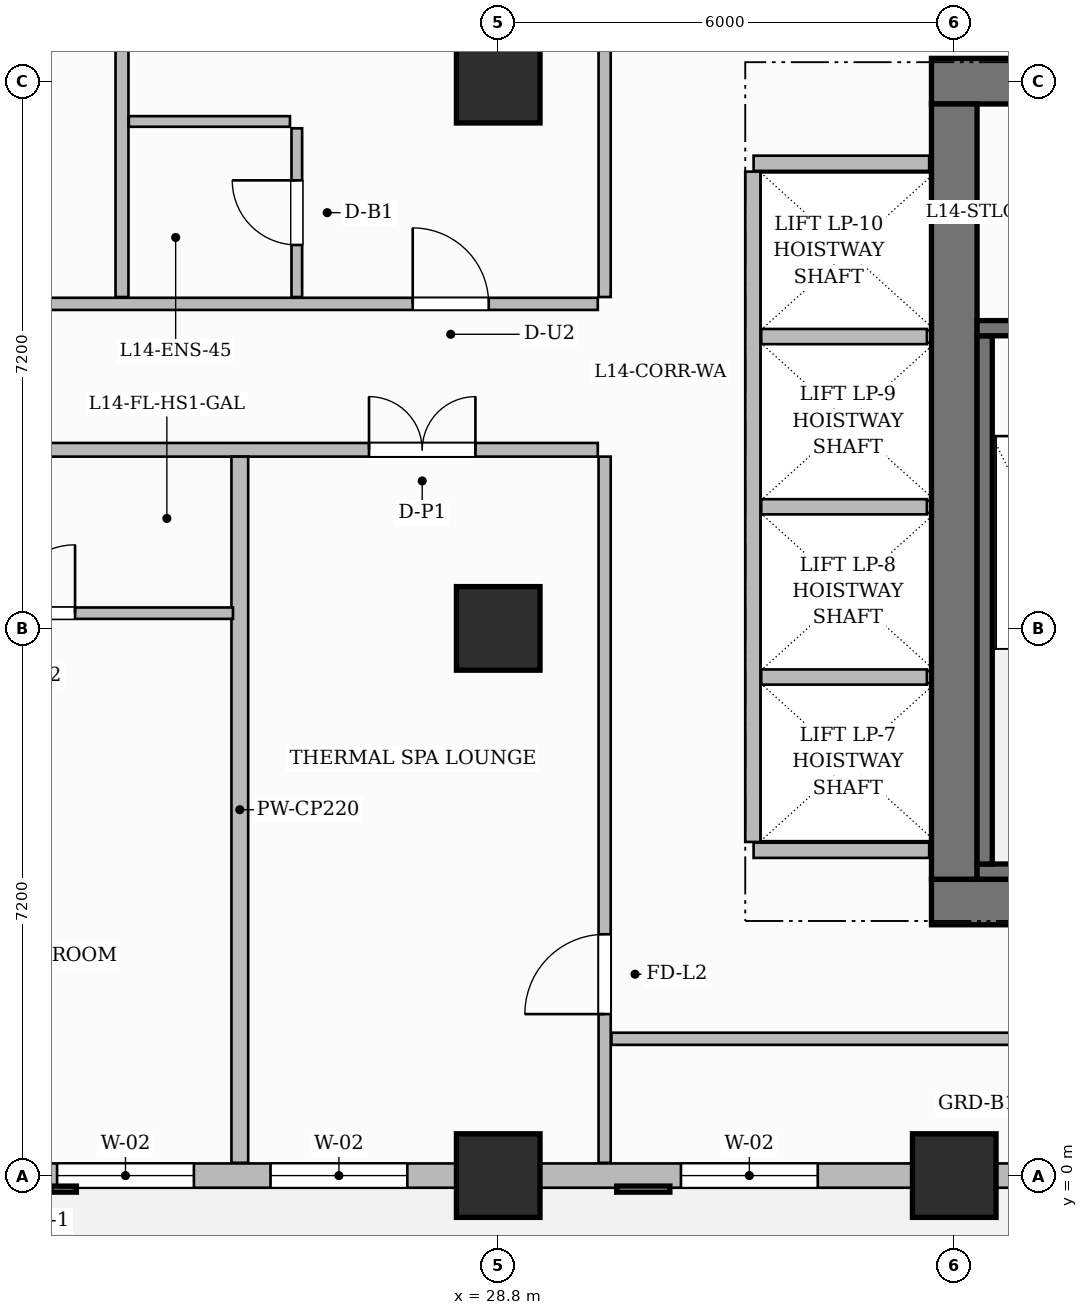
"""IFC4 building model, lengths in metres.
Left out: names, types, materials, properties, quantities, classifications, styles, units other than length and angle.
Written with IfcOpenShell. Run it as: python <this file> out.ifc"""

import sys

from ifc_helpers import new_model, si_unit, direction, frame, frame_2d, origin, origin_2d, place, context, subcontext, project, spatial, rectangle, extrude, source, transform, mapped, element, fill, save


model = new_model("IFC4")
c1 = context("Model", 3, precision=1e-05, world=origin(), true_north=direction((0.0, 1.0)))
c2 = subcontext(c1, "Body", "Model", "MODEL_VIEW")
j1 = project(units=[si_unit("LENGTHUNIT", "METRE"), si_unit("PLANEANGLEUNIT", "RADIAN")], contexts=[c1])
p1 = place(None, origin())
s1 = spatial("IfcSite", under=j1, at=p1, CompositionType="ELEMENT")
p2 = place(p1, origin())
s2 = spatial("IfcBuilding", under=s1, at=p2, CompositionType="ELEMENT")
p3 = place(p2, frame((0.0, 0.0, 62.0)))
s3 = spatial("IfcBuildingStorey", under=s2, at=p3, CompositionType="ELEMENT", Elevation=62.0)
p4 = place(p3, frame((34.5, 3.6, 0.0), z_axis=(0.0, 0.0, 1.0), x_axis=(1.0, 0.0, 0.0)))
e1 = element("IfcWall", 1, at=p4, inside=s3, PredefinedType="SHEAR", context=c2, shape_type="SweptSolid", body=[
    extrude(rectangle(XDim=15.6, YDim=0.6, at=frame_2d((7.8, 0.0))), origin(), (0.0, 0.0, 1.0), 3.7),
])
p5 = place(p4, frame((4.5, 0.0, 0.0)))
e2 = element("IfcOpeningElement", 2, at=p5, cuts=e1, PredefinedType="OPENING", context=c2, shape_type="SweptSolid", body=[
    extrude(rectangle(XDim=0.9, YDim=2.1, at=frame_2d((0.45, 1.05))), frame((0.0, 0.31, 0.0), z_axis=(0.0, -1.0, 0.0), x_axis=(1.0, 0.0, 0.0)), (0.0, 0.0, 1.0), 0.62),
])
p6 = place(p4, frame((6.95, 0.0, 0.0)))
e3 = element("IfcOpeningElement", 3, at=p6, cuts=e1, PredefinedType="OPENING", context=c2, shape_type="SweptSolid", body=[
    extrude(rectangle(XDim=0.9, YDim=2.1, at=frame_2d((0.45, 1.05))), frame((0.0, 0.31, 0.0), z_axis=(0.0, -1.0, 0.0), x_axis=(1.0, 0.0, 0.0)), (0.0, 0.0, 1.0), 0.62),
])
p7 = place(p3, frame((34.5, 14.4, 0.0), z_axis=(0.0, 0.0, 1.0), x_axis=(1.0, 0.0, 0.0)))
e4 = element("IfcWall", 4, at=p7, inside=s3, PredefinedType="SHEAR", context=c2, shape_type="SweptSolid", body=[
    extrude(rectangle(XDim=15.6, YDim=0.6, at=frame_2d((7.8, 0.0))), origin(), (0.0, 0.0, 1.0), 3.7),
])
p8 = place(p7, frame((5.43, 0.0, 0.0)))
e5 = element("IfcOpeningElement", 5, at=p8, cuts=e4, PredefinedType="OPENING", context=c2, shape_type="SweptSolid", body=[
    extrude(rectangle(XDim=1.5, YDim=2.2, at=frame_2d((0.75, 1.1))), frame((0.0, 0.31, 0.0), z_axis=(0.0, -1.0, 0.0), x_axis=(1.0, 0.0, 0.0)), (0.0, 0.0, 1.0), 0.62),
])
p9 = place(p7, frame((1.645, 0.0, 0.0)))
e6 = element("IfcOpeningElement", 6, at=p9, cuts=e4, PredefinedType="OPENING", context=c2, shape_type="SweptSolid", body=[
    extrude(rectangle(XDim=1.05, YDim=2.15, at=frame_2d((0.525, 1.075))), frame((0.0, 0.31, 0.0), z_axis=(0.0, -1.0, 0.0), x_axis=(1.0, 0.0, 0.0)), (0.0, 0.0, 1.0), 0.62),
])
p10 = place(p7, frame((11.275, 0.0, 0.0)))
e7 = element("IfcOpeningElement", 7, at=p10, cuts=e4, PredefinedType="OPENING", context=c2, shape_type="SweptSolid", body=[
    extrude(rectangle(XDim=1.05, YDim=2.15, at=frame_2d((0.525, 1.075))), frame((0.0, 0.31, 0.0), z_axis=(0.0, -1.0, 0.0), x_axis=(1.0, 0.0, 0.0)), (0.0, 0.0, 1.0), 0.62),
])
p11 = place(p3, frame((34.8, 3.9, 0.0), z_axis=(0.0, 0.0, 1.0), x_axis=(0.0, 1.0, 0.0)))
e8 = element("IfcWall", 8, at=p11, inside=s3, PredefinedType="SHEAR", context=c2, shape_type="SweptSolid", body=[
    extrude(rectangle(XDim=10.2, YDim=0.6, at=frame_2d((5.1, 0.0))), origin(), (0.0, 0.0, 1.0), 3.7),
])
m1 = source(origin(), c2, "Body", "SweptSolid", [
    extrude(rectangle(XDim=1.1, YDim=1.1, at=origin_2d()), origin(), (0.0, 0.0, 1.0), 3.7),
])
for number, where, z_axis, x_axis in (
    (9, (28.8, 0.0, 0.0), (0.0, 0.0, 1.0), (1.0, 0.0, 0.0)),
    (10, (28.8, 7.2, 0.0), (0.0, 0.0, 1.0), (1.0, 0.0, 0.0)),
    (11, (28.8, 14.4, 0.0), (0.0, 0.0, 1.0), (1.0, 0.0, 0.0)),
    (12, (34.8, 0.0, 0.0), (0.0, 0.0, 1.0), (1.0, 0.0, 0.0)),
):
    element("IfcColumn", number, at=place(p3, frame(where, z_axis=z_axis, x_axis=x_axis)), inside=s3, PredefinedType="COLUMN", context=c2, shape_type="MappedRepresentation", body=[
        mapped(m1, transform((0.0, 0.0, 0.0), scale=1.0)),
    ])
p12 = place(p3, frame((35.1, 4.0, 0.0), z_axis=(0.0, 0.0, 1.0), x_axis=(1.0, 0.0, 0.0)))
e13 = element("IfcWall", 13, at=p12, inside=s3, PredefinedType="SHEAR", context=c2, shape_type="SweptSolid", body=[
    extrude(rectangle(XDim=3.14, YDim=0.2, at=frame_2d((1.57, 0.0))), origin(), (0.0, 0.0, 1.0), 3.7),
])
p13 = place(p3, frame((35.2, 4.1, 0.0), z_axis=(0.0, 0.0, 1.0), x_axis=(0.0, 1.0, 0.0)))
e14 = element("IfcWall", 14, at=p13, inside=s3, PredefinedType="SHEAR", context=c2, shape_type="SweptSolid", body=[
    extrude(rectangle(XDim=6.95, YDim=0.2, at=frame_2d((3.475, 0.0))), origin(), (0.0, 0.0, 1.0), 3.7),
])
p14 = place(p3, frame((35.1, 11.15, 0.0), z_axis=(0.0, 0.0, 1.0), x_axis=(1.0, 0.0, 0.0)))
e15 = element("IfcWall", 15, at=p14, inside=s3, PredefinedType="SHEAR", context=c2, shape_type="SweptSolid", body=[
    extrude(rectangle(XDim=3.14, YDim=0.2, at=frame_2d((1.57, 0.0))), origin(), (0.0, 0.0, 1.0), 3.7),
])
p15 = place(p14, frame((1.045, 0.0, 0.0)))
e16 = element("IfcOpeningElement", 16, at=p15, cuts=e15, PredefinedType="OPENING", context=c2, shape_type="SweptSolid", body=[
    extrude(rectangle(XDim=1.05, YDim=2.2, at=frame_2d((0.525, 1.1))), frame((0.0, 0.11, 0.0), z_axis=(0.0, -1.0, 0.0), x_axis=(1.0, 0.0, 0.0)), (0.0, 0.0, 1.0), 0.22),
])
for number, where, z_axis, x_axis in (
    (17, (32.16, 4.28, 0.0), (0.0, 0.0, 1.0), (1.0, 0.0, 0.0)),
    (18, (32.16, 13.32, 0.0), (0.0, 0.0, 1.0), (1.0, 0.0, 0.0)),
):
    element("IfcWall", number, at=place(p3, frame(where, z_axis=z_axis, x_axis=x_axis)), inside=s3, PredefinedType="PARTITIONING", context=c2, shape_type="SweptSolid", body=[
        extrude(rectangle(XDim=2.31, YDim=0.2, at=frame_2d((1.155, 0.0))), origin(), (0.0, 0.0, 1.0), 3.45),
    ])
p16 = place(p3, frame((32.15, 4.39, 0.0), z_axis=(0.0, 0.0, 1.0), x_axis=(0.0, 1.0, 0.0)))
e19 = element("IfcWall", 19, at=p16, inside=s3, PredefinedType="PARTITIONING", context=c2, shape_type="SweptSolid", body=[
    extrude(rectangle(XDim=8.82, YDim=0.2, at=frame_2d((4.41, 0.0))), origin(), (0.0, 0.0, 1.0), 3.45),
])
for number, where, z_axis, x_axis in (
    (20, (32.26, 6.56, 0.0), (0.0, 0.0, 1.0), (1.0, 0.0, 0.0)),
    (21, (32.26, 8.8, 0.0), (0.0, 0.0, 1.0), (1.0, 0.0, 0.0)),
    (22, (32.26, 11.04, 0.0), (0.0, 0.0, 1.0), (1.0, 0.0, 0.0)),
):
    element("IfcWall", number, at=place(p3, frame(where, z_axis=z_axis, x_axis=x_axis)), inside=s3, PredefinedType="PARTITIONING", context=c2, shape_type="SweptSolid", body=[
        extrude(rectangle(XDim=2.18, YDim=0.2, at=frame_2d((1.09, 0.0))), origin(), (0.0, 0.0, 1.0), 3.45),
    ])
p17 = place(p3, frame((14.568, 9.55, 0.0), z_axis=(0.0, 0.0, 1.0), x_axis=(1.0, 0.0, 0.0)))
e23 = element("IfcWall", 23, at=p17, inside=s3, PredefinedType="PARTITIONING", context=c2, shape_type="SweptSolid", body=[
    extrude(rectangle(XDim=15.542, YDim=0.18, at=frame_2d((7.771, 0.0))), origin(), (0.0, 0.0, 1.0), 3.45),
])
p18 = place(p17, frame((3.062, 0.0, 0.0)))
e24 = element("IfcOpeningElement", 24, at=p18, cuts=e23, PredefinedType="OPENING", context=c2, shape_type="SweptSolid", body=[
    extrude(rectangle(XDim=1.05, YDim=2.25, at=frame_2d((0.525, 1.125))), frame((0.0, 0.1, 0.0), z_axis=(0.0, -1.0, 0.0), x_axis=(1.0, 0.0, 0.0)), (0.0, 0.0, 1.0), 0.2),
])
p19 = place(p17, frame((12.532, 0.0, 0.0)))
e25 = element("IfcOpeningElement", 25, at=p19, cuts=e23, PredefinedType="OPENING", context=c2, shape_type="SweptSolid", body=[
    extrude(rectangle(XDim=1.4, YDim=2.35, at=frame_2d((0.7, 1.175))), frame((0.0, 0.1, 0.0), z_axis=(0.0, -1.0, 0.0), x_axis=(1.0, 0.0, 0.0)), (0.0, 0.0, 1.0), 0.2),
])
p20 = place(p3, frame((14.568, 11.47, 0.0), z_axis=(0.0, 0.0, 1.0), x_axis=(1.0, 0.0, 0.0)))
e26 = element("IfcWall", 26, at=p20, inside=s3, PredefinedType="PARTITIONING", context=c2, shape_type="SweptSolid", body=[
    extrude(rectangle(XDim=15.542, YDim=0.16, at=frame_2d((7.771, 0.0))), origin(), (0.0, 0.0, 1.0), 3.45),
])
p21 = place(p20, frame((4.132, 0.0, 0.0)))
e27 = element("IfcOpeningElement", 27, at=p21, cuts=e26, PredefinedType="OPENING", context=c2, shape_type="SweptSolid", body=[
    extrude(rectangle(XDim=0.95, YDim=2.15, at=frame_2d((0.475, 1.075))), frame((0.0, 0.09, 0.0), z_axis=(0.0, -1.0, 0.0), x_axis=(1.0, 0.0, 0.0)), (0.0, 0.0, 1.0), 0.18),
])
p22 = place(p20, frame((13.107, 0.0, 0.0)))
e28 = element("IfcOpeningElement", 28, at=p22, cuts=e26, PredefinedType="OPENING", context=c2, shape_type="SweptSolid", body=[
    extrude(rectangle(XDim=1.0, YDim=2.2, at=frame_2d((0.5, 1.1))), frame((0.0, 0.09, 0.0), z_axis=(0.0, -1.0, 0.0), x_axis=(1.0, 0.0, 0.0)), (0.0, 0.0, 1.0), 0.18),
])
p23 = place(p3, frame((30.2, 11.56, 0.0), z_axis=(0.0, 0.0, 1.0), x_axis=(0.0, 1.0, 0.0)))
e29 = element("IfcWall", 29, at=p23, inside=s3, PredefinedType="PARTITIONING", context=c2, shape_type="SweptSolid", body=[
    extrude(rectangle(XDim=9.9, YDim=0.16, at=frame_2d((4.95, 0.0))), origin(), (0.0, 0.0, 1.0), 3.45),
])
p24 = place(p3, frame((30.2, 0.168, 0.0), z_axis=(0.0, 0.0, 1.0), x_axis=(0.0, 1.0, 0.0)))
e30 = element("IfcWall", 30, at=p24, inside=s3, PredefinedType="PARTITIONING", context=c2, shape_type="SweptSolid", body=[
    extrude(rectangle(XDim=9.292, YDim=0.16, at=frame_2d((4.646, 0.0))), origin(), (0.0, 0.0, 1.0), 3.45),
])
p25 = place(p24, frame((1.957, 0.0, 0.0)))
e31 = element("IfcOpeningElement", 31, at=p25, cuts=e30, PredefinedType="OPENING", context=c2, shape_type="SweptSolid", body=[
    extrude(rectangle(XDim=1.05, YDim=2.15, at=frame_2d((0.525, 1.075))), frame((0.0, 0.09, 0.0), z_axis=(0.0, -1.0, 0.0), x_axis=(1.0, 0.0, 0.0)), (0.0, 0.0, 1.0), 0.18),
])
p26 = place(p3, frame((30.29, 1.8, 0.0), z_axis=(0.0, 0.0, 1.0), x_axis=(1.0, 0.0, 0.0)))
e32 = element("IfcWall", 32, at=p26, inside=s3, PredefinedType="PARTITIONING", context=c2, shape_type="SweptSolid", body=[
    extrude(rectangle(XDim=19.37, YDim=0.16, at=frame_2d((9.685, 0.0))), origin(), (0.0, 0.0, 1.0), 3.45),
])
p27 = place(p26, frame((9.735, 0.0, 0.0)))
e33 = element("IfcOpeningElement", 33, at=p27, cuts=e32, PredefinedType="OPENING", context=c2, shape_type="SweptSolid", body=[
    extrude(rectangle(XDim=0.95, YDim=2.15, at=frame_2d((0.475, 1.075))), frame((0.0, 0.09, 0.0), z_axis=(0.0, -1.0, 0.0), x_axis=(1.0, 0.0, 0.0)), (0.0, 0.0, 1.0), 0.18),
])
p28 = place(p3, frame((25.4, 0.168, 0.0), z_axis=(0.0, 0.0, 1.0), x_axis=(0.0, 1.0, 0.0)))
e34 = element("IfcWall", 34, at=p28, inside=s3, PredefinedType="PARTITIONING", context=c2, shape_type="SweptSolid", body=[
    extrude(rectangle(XDim=9.292, YDim=0.22, at=frame_2d((4.646, 0.0))), origin(), (0.0, 0.0, 1.0), 3.035),
])
p29 = place(p3, frame((19.57, 7.4, 0.0), z_axis=(0.0, 0.0, 1.0), x_axis=(1.0, 0.0, 0.0)))
e35 = element("IfcWall", 35, at=p29, inside=s3, PredefinedType="PARTITIONING", context=c2, shape_type="SweptSolid", body=[
    extrude(rectangle(XDim=5.74, YDim=0.15, at=frame_2d((2.87, 0.0))), origin(), (0.0, 0.0, 1.0), 2.885),
])
p30 = place(p29, frame((2.762, 0.0, 0.0)))
e36 = element("IfcOpeningElement", 36, at=p30, cuts=e35, PredefinedType="OPENING", context=c2, shape_type="SweptSolid", body=[
    extrude(rectangle(XDim=0.9, YDim=2.15, at=frame_2d((0.45, 1.075))), frame((0.0, 0.085, 0.0), z_axis=(0.0, -1.0, 0.0), x_axis=(1.0, 0.0, 0.0)), (0.0, 0.0, 1.0), 0.17),
])
p31 = place(p3, frame((23.85, 11.56, 0.0), z_axis=(0.0, 0.0, 1.0), x_axis=(0.0, 1.0, 0.0)))
e37 = element("IfcWall", 37, at=p31, inside=s3, PredefinedType="PARTITIONING", context=c2, shape_type="SweptSolid", body=[
    extrude(rectangle(XDim=9.872, YDim=0.17, at=frame_2d((4.936, 0.0))), origin(), (0.0, 0.0, 1.0), 3.45),
])
p32 = place(p3, frame((26.15, 11.56, 0.0), z_axis=(0.0, 0.0, 1.0), x_axis=(0.0, 1.0, 0.0)))
e38 = element("IfcWall", 38, at=p32, inside=s3, PredefinedType="PARTITIONING", context=c2, shape_type="SweptSolid", body=[
    extrude(rectangle(XDim=2.22, YDim=0.14, at=frame_2d((1.11, 0.0))), origin(), (0.0, 0.0, 1.0), 3.45),
])
p33 = place(p32, frame((0.685, 0.0, 0.0)))
e39 = element("IfcOpeningElement", 39, at=p33, cuts=e38, PredefinedType="OPENING", context=c2, shape_type="SweptSolid", body=[
    extrude(rectangle(XDim=0.85, YDim=2.1, at=frame_2d((0.425, 1.05))), frame((0.0, 0.08, 0.0), z_axis=(0.0, -1.0, 0.0), x_axis=(1.0, 0.0, 0.0)), (0.0, 0.0, 1.0), 0.16),
])
p34 = place(p3, frame((23.94, 13.87, 0.0), z_axis=(0.0, 0.0, 1.0), x_axis=(1.0, 0.0, 0.0)))
e40 = element("IfcWall", 40, at=p34, inside=s3, PredefinedType="PARTITIONING", context=c2, shape_type="SweptSolid", body=[
    extrude(rectangle(XDim=2.12, YDim=0.14, at=frame_2d((1.06, 0.0))), origin(), (0.0, 0.0, 1.0), 3.45),
])
p35 = place(p3, frame((14.4, 0.0, 0.0), z_axis=(0.0, 0.0, 1.0), x_axis=(1.0, 0.0, 0.0)))
e41 = element("IfcWall", 41, at=p35, inside=s3, PredefinedType="SOLIDWALL", context=c2, shape_type="SweptSolid", body=[
    extrude(rectangle(XDim=43.2, YDim=0.32, at=frame_2d((21.6, 0.0))), origin(), (0.0, 0.0, 1.0), 2.885),
])
p36 = place(p35, frame((1.5, 0.0, 0.0)))
e42 = element("IfcOpeningElement", 42, at=p36, cuts=e41, PredefinedType="OPENING", context=c2, shape_type="SweptSolid", body=[
    extrude(rectangle(XDim=1.2, YDim=2.2, at=frame_2d((0.6, 1.1))), frame((0.0, 0.17, 0.0), z_axis=(0.0, -1.0, 0.0), x_axis=(1.0, 0.0, 0.0)), (0.0, 0.0, 1.0), 0.34),
])
p37 = place(p35, frame((3.336, 0.0, 0.8)))
e43 = element("IfcOpeningElement", 43, at=p37, cuts=e41, PredefinedType="OPENING", context=c2, shape_type="SweptSolid", body=[
    extrude(rectangle(XDim=1.4, YDim=1.85, at=frame_2d((0.7, 0.925))), frame((0.0, 0.17, 0.0), z_axis=(0.0, -1.0, 0.0), x_axis=(1.0, 0.0, 0.0)), (0.0, 0.0, 1.0), 0.34),
])
p38 = place(p35, frame((5.269, 0.0, 0.8)))
e44 = element("IfcOpeningElement", 44, at=p38, cuts=e41, PredefinedType="OPENING", context=c2, shape_type="SweptSolid", body=[
    extrude(rectangle(XDim=0.95, YDim=1.75, at=frame_2d((0.475, 0.875))), frame((0.0, 0.17, 0.0), z_axis=(0.0, -1.0, 0.0), x_axis=(1.0, 0.0, 0.0)), (0.0, 0.0, 1.0), 0.34),
])
p39 = place(p35, frame((8.596, 0.0, 0.8)))
e45 = element("IfcOpeningElement", 45, at=p39, cuts=e41, PredefinedType="OPENING", context=c2, shape_type="SweptSolid", body=[
    extrude(rectangle(XDim=1.8, YDim=1.85, at=frame_2d((0.9, 0.925))), frame((0.0, 0.17, 0.0), z_axis=(0.0, -1.0, 0.0), x_axis=(1.0, 0.0, 0.0)), (0.0, 0.0, 1.0), 0.34),
])
p40 = place(p35, frame((11.404, 0.0, 0.8)))
e46 = element("IfcOpeningElement", 46, at=p40, cuts=e41, PredefinedType="OPENING", context=c2, shape_type="SweptSolid", body=[
    extrude(rectangle(XDim=1.8, YDim=1.85, at=frame_2d((0.9, 0.925))), frame((0.0, 0.17, 0.0), z_axis=(0.0, -1.0, 0.0), x_axis=(1.0, 0.0, 0.0)), (0.0, 0.0, 1.0), 0.34),
])
p41 = place(p35, frame((16.804, 0.0, 0.8)))
e47 = element("IfcOpeningElement", 47, at=p41, cuts=e41, PredefinedType="OPENING", context=c2, shape_type="SweptSolid", body=[
    extrude(rectangle(XDim=1.8, YDim=1.85, at=frame_2d((0.9, 0.925))), frame((0.0, 0.17, 0.0), z_axis=(0.0, -1.0, 0.0), x_axis=(1.0, 0.0, 0.0)), (0.0, 0.0, 1.0), 0.34),
])
p42 = place(p35, frame((21.725, 0.0, 0.8)))
e48 = element("IfcOpeningElement", 48, at=p42, cuts=e41, PredefinedType="OPENING", context=c2, shape_type="SweptSolid", body=[
    extrude(rectangle(XDim=1.8, YDim=1.85, at=frame_2d((0.9, 0.925))), frame((0.0, 0.17, 0.0), z_axis=(0.0, -1.0, 0.0), x_axis=(1.0, 0.0, 0.0)), (0.0, 0.0, 1.0), 0.34),
])
p43 = place(p35, frame((24.475, 0.0, 0.8)))
e49 = element("IfcOpeningElement", 49, at=p43, cuts=e41, PredefinedType="OPENING", context=c2, shape_type="SweptSolid", body=[
    extrude(rectangle(XDim=1.8, YDim=1.85, at=frame_2d((0.9, 0.925))), frame((0.0, 0.17, 0.0), z_axis=(0.0, -1.0, 0.0), x_axis=(1.0, 0.0, 0.0)), (0.0, 0.0, 1.0), 0.34),
])
p44 = place(p35, frame((29.075, 0.0, 0.8)))
e50 = element("IfcOpeningElement", 50, at=p44, cuts=e41, PredefinedType="OPENING", context=c2, shape_type="SweptSolid", body=[
    extrude(rectangle(XDim=1.8, YDim=1.85, at=frame_2d((0.9, 0.925))), frame((0.0, 0.17, 0.0), z_axis=(0.0, -1.0, 0.0), x_axis=(1.0, 0.0, 0.0)), (0.0, 0.0, 1.0), 0.34),
])
p45 = place(p35, frame((32.125, 0.0, 0.8)))
e51 = element("IfcOpeningElement", 51, at=p45, cuts=e41, PredefinedType="OPENING", context=c2, shape_type="SweptSolid", body=[
    extrude(rectangle(XDim=1.8, YDim=1.85, at=frame_2d((0.9, 0.925))), frame((0.0, 0.17, 0.0), z_axis=(0.0, -1.0, 0.0), x_axis=(1.0, 0.0, 0.0)), (0.0, 0.0, 1.0), 0.34),
])
p46 = place(p35, frame((36.875, 0.0, 0.8)))
e52 = element("IfcOpeningElement", 52, at=p46, cuts=e41, PredefinedType="OPENING", context=c2, shape_type="SweptSolid", body=[
    extrude(rectangle(XDim=1.8, YDim=1.85, at=frame_2d((0.9, 0.925))), frame((0.0, 0.17, 0.0), z_axis=(0.0, -1.0, 0.0), x_axis=(1.0, 0.0, 0.0)), (0.0, 0.0, 1.0), 0.34),
])
p47 = place(p35, frame((39.925, 0.0, 0.8)))
e53 = element("IfcOpeningElement", 53, at=p47, cuts=e41, PredefinedType="OPENING", context=c2, shape_type="SweptSolid", body=[
    extrude(rectangle(XDim=1.8, YDim=1.85, at=frame_2d((0.9, 0.925))), frame((0.0, 0.17, 0.0), z_axis=(0.0, -1.0, 0.0), x_axis=(1.0, 0.0, 0.0)), (0.0, 0.0, 1.0), 0.34),
])
m2 = source(origin(), c2, "Body", "SweptSolid", [
    extrude(rectangle(XDim=1.05, YDim=2.15, at=frame_2d((0.525, 1.075))), frame((0.0, 0.025, 0.0), z_axis=(0.0, -1.0, 0.0), x_axis=(1.0, 0.0, 0.0)), (0.0, 0.0, 1.0), 0.05),
])
p48 = place(p25, origin())
e54 = element("IfcDoor", 54, at=p48, inside=s3, OperationType="SINGLE_SWING_LEFT", PredefinedType="DOOR", context=c2, shape_type="MappedRepresentation", body=[
    mapped(m2, transform((0.0, 0.0, 0.0), scale=1.0)),
])
fill(e31, e54)
m3 = source(origin(), c2, "Body", "SweptSolid", [
    extrude(rectangle(XDim=0.9, YDim=2.15, at=frame_2d((0.45, 1.075))), frame((0.0, 0.025, 0.0), z_axis=(0.0, -1.0, 0.0), x_axis=(1.0, 0.0, 0.0)), (0.0, 0.0, 1.0), 0.05),
])
p49 = place(p30, origin())
e55 = element("IfcDoor", 55, at=p49, inside=s3, OperationType="SINGLE_SWING_RIGHT", PredefinedType="DOOR", context=c2, shape_type="MappedRepresentation", body=[
    mapped(m3, transform((0.0, 0.0, 0.0), scale=1.0)),
])
fill(e36, e55)
m4 = source(origin(), c2, "Body", "SweptSolid", [
    extrude(rectangle(XDim=1.4, YDim=2.35, at=frame_2d((0.7, 1.175))), frame((0.0, 0.025, 0.0), z_axis=(0.0, -1.0, 0.0), x_axis=(1.0, 0.0, 0.0)), (0.0, 0.0, 1.0), 0.05),
])
p50 = place(p19, origin())
e56 = element("IfcDoor", 56, at=p50, inside=s3, OperationType="DOUBLE_DOOR_SINGLE_SWING", PredefinedType="DOOR", context=c2, shape_type="MappedRepresentation", body=[
    mapped(m4, transform((0.0, 0.0, 0.0), scale=1.0)),
])
fill(e25, e56)
m5 = source(origin(), c2, "Body", "SweptSolid", [
    extrude(rectangle(XDim=0.85, YDim=2.1, at=frame_2d((0.425, 1.05))), frame((0.0, 0.025, 0.0), z_axis=(0.0, -1.0, 0.0), x_axis=(1.0, 0.0, 0.0)), (0.0, 0.0, 1.0), 0.05),
])
p51 = place(p33, origin())
e57 = element("IfcDoor", 57, at=p51, inside=s3, OperationType="SINGLE_SWING_RIGHT", PredefinedType="DOOR", context=c2, shape_type="MappedRepresentation", body=[
    mapped(m5, transform((0.0, 0.0, 0.0), scale=1.0)),
])
fill(e39, e57)
m6 = source(origin(), c2, "Body", "SweptSolid", [
    extrude(rectangle(XDim=1.0, YDim=2.2, at=frame_2d((0.5, 1.1))), frame((0.0, 0.025, 0.0), z_axis=(0.0, -1.0, 0.0), x_axis=(1.0, 0.0, 0.0)), (0.0, 0.0, 1.0), 0.05),
])
p52 = place(p22, origin())
e58 = element("IfcDoor", 58, at=p52, inside=s3, OperationType="SINGLE_SWING_LEFT", PredefinedType="DOOR", context=c2, shape_type="MappedRepresentation", body=[
    mapped(m6, transform((0.0, 0.0, 0.0), scale=1.0)),
])
fill(e28, e58)
m7 = source(origin(), c2, "Body", "SweptSolid", [
    extrude(rectangle(XDim=1.8, YDim=1.85, at=frame_2d((0.9, 0.925))), frame((0.0, 0.03, 0.0), z_axis=(0.0, -1.0, 0.0), x_axis=(1.0, 0.0, 0.0)), (0.0, 0.0, 1.0), 0.06),
])
p53 = place(p39, origin())
e59 = element("IfcWindow", 59, at=p53, inside=s3, PartitioningType="DOUBLE_PANEL_VERTICAL", PredefinedType="WINDOW", context=c2, shape_type="MappedRepresentation", body=[
    mapped(m7, transform((0.0, 0.0, 0.0), scale=1.0)),
])
fill(e45, e59)
p54 = place(p40, origin())
e60 = element("IfcWindow", 60, at=p54, inside=s3, PartitioningType="DOUBLE_PANEL_VERTICAL", PredefinedType="WINDOW", context=c2, shape_type="MappedRepresentation", body=[
    mapped(m7, transform((0.0, 0.0, 0.0), scale=1.0)),
])
fill(e46, e60)
p55 = place(p41, origin())
e61 = element("IfcWindow", 61, at=p55, inside=s3, PartitioningType="DOUBLE_PANEL_VERTICAL", PredefinedType="WINDOW", context=c2, shape_type="MappedRepresentation", body=[
    mapped(m7, transform((0.0, 0.0, 0.0), scale=1.0)),
])
fill(e47, e61)
save(model, sys.argv[1])
